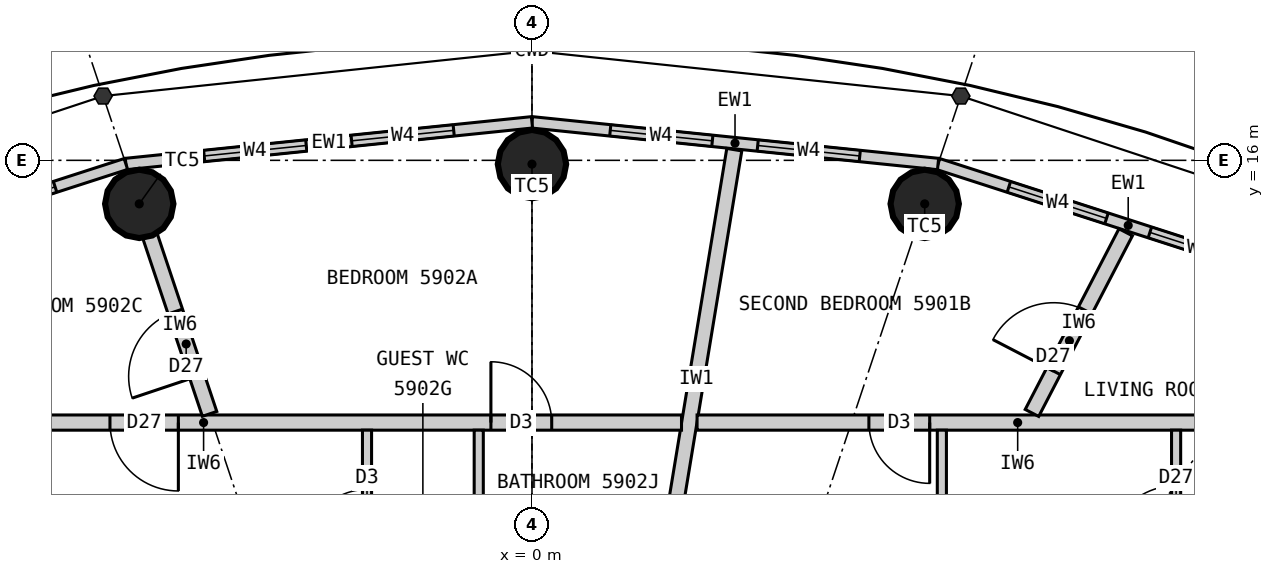
"""IFC4 building model, lengths in metres.
Left out: names, types, materials, properties, quantities, classifications, styles, units other than length and angle.
Written with IfcOpenShell. Run it as: python <this file> out.ifc"""

import sys

from ifc_helpers import new_model, si_unit, direction, frame, frame_2d, origin, origin_2d, place, context, subcontext, project, spatial, rectangle, circle, extrude, element, fill, save


model = new_model("IFC4")
c1 = context("Model", 3, precision=1e-05, world=origin(), true_north=direction((0.0, 1.0)))
c2 = subcontext(c1, "Body", "Model", "MODEL_VIEW")
j1 = project(units=[si_unit("LENGTHUNIT", "METRE"), si_unit("PLANEANGLEUNIT", "RADIAN")], contexts=[c1])
p1 = place(None, origin())
s1 = spatial("IfcSite", under=j1, at=p1, CompositionType="ELEMENT")
p2 = place(p1, origin())
s2 = spatial("IfcBuilding", under=s1, at=p2, CompositionType="ELEMENT")
p3 = place(p2, frame((0.0, 0.0, 219.3)))
s3 = spatial("IfcBuildingStorey", under=s2, at=p3, CompositionType="ELEMENT", Elevation=219.3)
for number, where, z_axis, x_axis in (
    (1, (5.167, 15.427, 0.0), (0.0, 0.0, 1.0), (1.0, 0.0, 0.0)),
    (2, (0.0, 15.95, 0.0), (0.0, 0.0, 1.0), (1.0, 0.0, 0.0)),
    (3, (-5.167, 15.427, 0.0), (0.0, 0.0, 1.0), (1.0, 0.0, 0.0)),
):
    element("IfcColumn", number, at=place(p3, frame(where, z_axis=z_axis, x_axis=x_axis)), inside=s3, PredefinedType="COLUMN", context=c2, shape_type="SweptSolid", body=[
        extrude(circle(Radius=0.45, at=origin_2d()), origin(), (0.0, 0.0, 1.0), 3.3),
    ])
p4 = place(p3, frame((10.346, 14.336, 0.0), z_axis=(0.0, 0.0, 1.0), x_axis=(-0.951644702515, 0.307200846638, 0.0)))
e4 = element("IfcWall", 4, at=p4, inside=s3, PredefinedType="ELEMENTEDWALL", context=c2, shape_type="SweptSolid", body=[
    extrude(rectangle(XDim=5.258, YDim=0.15, at=frame_2d((2.629, 0.0))), origin(), (0.0, 0.0, 1.0), 3.12),
])
p5 = place(p4, frame((0.979, 0.0, 0.9)))
e5 = element("IfcOpeningElement", 5, at=p5, cuts=e4, PredefinedType="OPENING", context=c2, shape_type="SweptSolid", body=[
    extrude(rectangle(XDim=1.35, YDim=1.9, at=frame_2d((0.675, 0.95))), frame((0.0, 0.085, 0.0), z_axis=(0.0, -1.0, 0.0), x_axis=(1.0, 0.0, 0.0)), (0.0, 0.0, 1.0), 0.17),
])
p6 = place(p4, frame((2.929, 0.0, 0.9)))
e6 = element("IfcOpeningElement", 6, at=p6, cuts=e4, PredefinedType="OPENING", context=c2, shape_type="SweptSolid", body=[
    extrude(rectangle(XDim=1.35, YDim=1.9, at=frame_2d((0.675, 0.95))), frame((0.0, 0.085, 0.0), z_axis=(0.0, -1.0, 0.0), x_axis=(1.0, 0.0, 0.0)), (0.0, 0.0, 1.0), 0.17),
])
p7 = place(p3, frame((5.343, 15.952, 0.0), z_axis=(0.0, 0.0, 1.0), x_axis=(-0.994774574972, 0.102095763818, 0.0)))
e7 = element("IfcWall", 7, at=p7, inside=s3, PredefinedType="ELEMENTEDWALL", context=c2, shape_type="SweptSolid", body=[
    extrude(rectangle(XDim=5.371, YDim=0.15, at=frame_2d((2.686, 0.0))), origin(), (0.0, 0.0, 1.0), 3.12),
])
p8 = place(p7, frame((1.035, 0.0, 0.9)))
e8 = element("IfcOpeningElement", 8, at=p8, cuts=e7, PredefinedType="OPENING", context=c2, shape_type="SweptSolid", body=[
    extrude(rectangle(XDim=1.35, YDim=1.9, at=frame_2d((0.675, 0.95))), frame((0.0, 0.085, 0.0), z_axis=(0.0, -1.0, 0.0), x_axis=(1.0, 0.0, 0.0)), (0.0, 0.0, 1.0), 0.17),
])
p9 = place(p7, frame((2.985, 0.0, 0.9)))
e9 = element("IfcOpeningElement", 9, at=p9, cuts=e7, PredefinedType="OPENING", context=c2, shape_type="SweptSolid", body=[
    extrude(rectangle(XDim=1.35, YDim=1.9, at=frame_2d((0.675, 0.95))), frame((0.0, 0.085, 0.0), z_axis=(0.0, -1.0, 0.0), x_axis=(1.0, 0.0, 0.0)), (0.0, 0.0, 1.0), 0.17),
])
p10 = place(p3, frame((0.0, 16.5, 0.0), z_axis=(0.0, 0.0, 1.0), x_axis=(-0.994774574972, -0.102095763818, 0.0)))
e10 = element("IfcWall", 10, at=p10, inside=s3, PredefinedType="ELEMENTEDWALL", context=c2, shape_type="SweptSolid", body=[
    extrude(rectangle(XDim=5.371, YDim=0.15, at=frame_2d((2.686, 0.0))), origin(), (0.0, 0.0, 1.0), 3.12),
])
p11 = place(p10, frame((1.035, 0.0, 0.9)))
e11 = element("IfcOpeningElement", 11, at=p11, cuts=e10, PredefinedType="OPENING", context=c2, shape_type="SweptSolid", body=[
    extrude(rectangle(XDim=1.35, YDim=1.9, at=frame_2d((0.675, 0.95))), frame((0.0, 0.085, 0.0), z_axis=(0.0, -1.0, 0.0), x_axis=(1.0, 0.0, 0.0)), (0.0, 0.0, 1.0), 0.17),
])
p12 = place(p10, frame((2.985, 0.0, 0.9)))
e12 = element("IfcOpeningElement", 12, at=p12, cuts=e10, PredefinedType="OPENING", context=c2, shape_type="SweptSolid", body=[
    extrude(rectangle(XDim=1.35, YDim=1.9, at=frame_2d((0.675, 0.95))), frame((0.0, 0.085, 0.0), z_axis=(0.0, -1.0, 0.0), x_axis=(1.0, 0.0, 0.0)), (0.0, 0.0, 1.0), 0.17),
])
p13 = place(p3, frame((-5.343, 15.952, 0.0), z_axis=(0.0, 0.0, 1.0), x_axis=(-0.951644702515, -0.307200846638, 0.0)))
e13 = element("IfcWall", 13, at=p13, inside=s3, PredefinedType="ELEMENTEDWALL", context=c2, shape_type="SweptSolid", body=[
    extrude(rectangle(XDim=5.258, YDim=0.15, at=frame_2d((2.629, 0.0))), origin(), (0.0, 0.0, 1.0), 3.12),
])
p14 = place(p13, frame((0.979, 0.0, 0.9)))
e14 = element("IfcOpeningElement", 14, at=p14, cuts=e13, PredefinedType="OPENING", context=c2, shape_type="SweptSolid", body=[
    extrude(rectangle(XDim=1.35, YDim=1.9, at=frame_2d((0.675, 0.95))), frame((0.0, 0.085, 0.0), z_axis=(0.0, -1.0, 0.0), x_axis=(1.0, 0.0, 0.0)), (0.0, 0.0, 1.0), 0.17),
])
p15 = place(p13, frame((2.929, 0.0, 0.9)))
e15 = element("IfcOpeningElement", 15, at=p15, cuts=e13, PredefinedType="OPENING", context=c2, shape_type="SweptSolid", body=[
    extrude(rectangle(XDim=1.35, YDim=1.9, at=frame_2d((0.675, 0.95))), frame((0.0, 0.085, 0.0), z_axis=(0.0, -1.0, 0.0), x_axis=(1.0, 0.0, 0.0)), (0.0, 0.0, 1.0), 0.17),
])
p16 = place(p3, frame((1.666, 10.1, 0.0), z_axis=(0.0, 0.0, 1.0), x_axis=(0.162710847913, 0.986673796131, 0.0)))
e16 = element("IfcWall", 16, at=p16, inside=s3, PredefinedType="PARTITIONING", context=c2, shape_type="SweptSolid", body=[
    extrude(rectangle(XDim=6.122, YDim=0.2, at=frame_2d((3.061, 0.0))), origin(), (0.0, 0.0, 1.0), 3.12),
])
p17 = place(p3, frame((10.609, 12.55, 0.0), z_axis=(0.0, 0.0, 1.0), x_axis=(-1.0, 0.0, 0.0)))
e17 = element("IfcWall", 17, at=p17, inside=s3, PredefinedType="PARTITIONING", context=c2, shape_type="SweptSolid", body=[
    extrude(rectangle(XDim=8.437, YDim=0.2, at=frame_2d((4.218, 0.0))), origin(), (0.0, 0.0, 1.0), 3.12),
])
p18 = place(p17, frame((5.376, 0.0, 0.0)))
e18 = element("IfcOpeningElement", 18, at=p18, cuts=e17, PredefinedType="OPENING", context=c2, shape_type="SweptSolid", body=[
    extrude(rectangle(XDim=0.8, YDim=2.1, at=frame_2d((0.4, 1.05))), frame((0.0, 0.11, 0.0), z_axis=(0.0, -1.0, 0.0), x_axis=(1.0, 0.0, 0.0)), (0.0, 0.0, 1.0), 0.22),
])
p19 = place(p3, frame((6.578, 12.677, 0.0), z_axis=(0.0, 0.0, 1.0), x_axis=(0.460620531465, 0.887597164255, 0.0)))
e19 = element("IfcWall", 19, at=p19, inside=s3, PredefinedType="PARTITIONING", context=c2, shape_type="SweptSolid", body=[
    extrude(rectangle(XDim=2.678, YDim=0.2, at=frame_2d((1.339, 0.0))), origin(), (0.0, 0.0, 1.0), 3.12),
])
p20 = place(p19, frame((0.62, 0.0, 0.0)))
e20 = element("IfcOpeningElement", 20, at=p20, cuts=e19, PredefinedType="OPENING", context=c2, shape_type="SweptSolid", body=[
    extrude(rectangle(XDim=0.9, YDim=2.1, at=frame_2d((0.45, 1.05))), frame((0.0, 0.11, 0.0), z_axis=(0.0, -1.0, 0.0), x_axis=(1.0, 0.0, 0.0)), (0.0, 0.0, 1.0), 0.22),
])
p21 = place(p3, frame((8.475, 10.1, 0.0), z_axis=(0.0, 0.0, 1.0), x_axis=(0.0, 1.0, 0.0)))
e21 = element("IfcWall", 21, at=p21, inside=s3, PredefinedType="PARTITIONING", context=c2, shape_type="SweptSolid", body=[
    extrude(rectangle(XDim=2.35, YDim=0.12, at=frame_2d((1.175, 0.0))), origin(), (0.0, 0.0, 1.0), 3.12),
])
p22 = place(p21, frame((0.72, 0.0, 0.0)))
e22 = element("IfcOpeningElement", 22, at=p22, cuts=e21, PredefinedType="OPENING", context=c2, shape_type="SweptSolid", body=[
    extrude(rectangle(XDim=0.9, YDim=2.1, at=frame_2d((0.45, 1.05))), frame((0.0, 0.07, 0.0), z_axis=(0.0, -1.0, 0.0), x_axis=(1.0, 0.0, 0.0)), (0.0, 0.0, 1.0), 0.14),
])
p23 = place(p3, frame((5.393, 10.1, 0.0), z_axis=(0.0, 0.0, 1.0), x_axis=(0.0, 1.0, 0.0)))
e23 = element("IfcWall", 23, at=p23, inside=s3, PredefinedType="PARTITIONING", context=c2, shape_type="SweptSolid", body=[
    extrude(rectangle(XDim=2.35, YDim=0.12, at=frame_2d((1.175, 0.0))), origin(), (0.0, 0.0, 1.0), 3.12),
])
p24 = place(p3, frame((1.968, 12.55, 0.0), z_axis=(0.0, 0.0, 1.0), x_axis=(-1.0, 0.0, 0.0)))
e24 = element("IfcWall", 24, at=p24, inside=s3, PredefinedType="PARTITIONING", context=c2, shape_type="SweptSolid", body=[
    extrude(rectangle(XDim=12.576, YDim=0.2, at=frame_2d((6.288, 0.0))), origin(), (0.0, 0.0, 1.0), 3.12),
])
p25 = place(p24, frame((1.708, 0.0, 0.0)))
e25 = element("IfcOpeningElement", 25, at=p25, cuts=e24, PredefinedType="OPENING", context=c2, shape_type="SweptSolid", body=[
    extrude(rectangle(XDim=0.8, YDim=2.1, at=frame_2d((0.4, 1.05))), frame((0.0, 0.11, 0.0), z_axis=(0.0, -1.0, 0.0), x_axis=(1.0, 0.0, 0.0)), (0.0, 0.0, 1.0), 0.22),
])
p26 = place(p24, frame((6.62, 0.0, 0.0)))
e26 = element("IfcOpeningElement", 26, at=p26, cuts=e24, PredefinedType="OPENING", context=c2, shape_type="SweptSolid", body=[
    extrude(rectangle(XDim=0.9, YDim=2.1, at=frame_2d((0.45, 1.05))), frame((0.0, 0.11, 0.0), z_axis=(0.0, -1.0, 0.0), x_axis=(1.0, 0.0, 0.0)), (0.0, 0.0, 1.0), 0.22),
])
p27 = place(p3, frame((-4.242, 12.664, 0.0), z_axis=(0.0, 0.0, 1.0), x_axis=(-0.317594928911, 0.948226481981, 0.0)))
e27 = element("IfcWall", 27, at=p27, inside=s3, PredefinedType="PARTITIONING", context=c2, shape_type="SweptSolid", body=[
    extrude(rectangle(XDim=2.464, YDim=0.2, at=frame_2d((1.232, 0.0))), origin(), (0.0, 0.0, 1.0), 2.42),
])
p28 = place(p27, frame((0.52, 0.0, 0.0)))
e28 = element("IfcOpeningElement", 28, at=p28, cuts=e27, PredefinedType="OPENING", context=c2, shape_type="SweptSolid", body=[
    extrude(rectangle(XDim=0.9, YDim=2.1, at=frame_2d((0.45, 1.05))), frame((0.0, 0.11, 0.0), z_axis=(0.0, -1.0, 0.0), x_axis=(1.0, 0.0, 0.0)), (0.0, 0.0, 1.0), 0.22),
])
p29 = place(p3, frame((-0.7, 10.1, 0.0), z_axis=(0.0, 0.0, 1.0), x_axis=(0.0, 1.0, 0.0)))
e29 = element("IfcWall", 29, at=p29, inside=s3, PredefinedType="PARTITIONING", context=c2, shape_type="SweptSolid", body=[
    extrude(rectangle(XDim=2.35, YDim=0.12, at=frame_2d((1.175, 0.0))), origin(), (0.0, 0.0, 1.0), 3.12),
])
p30 = place(p3, frame((-2.17, 10.1, 0.0), z_axis=(0.0, 0.0, 1.0), x_axis=(0.0, 1.0, 0.0)))
e30 = element("IfcWall", 30, at=p30, inside=s3, PredefinedType="PARTITIONING", context=c2, shape_type="SweptSolid", body=[
    extrude(rectangle(XDim=2.35, YDim=0.12, at=frame_2d((1.175, 0.0))), origin(), (0.0, 0.0, 1.0), 3.12),
])
p31 = place(p30, frame((0.77, 0.0, 0.0)))
e31 = element("IfcOpeningElement", 31, at=p31, cuts=e30, PredefinedType="OPENING", context=c2, shape_type="SweptSolid", body=[
    extrude(rectangle(XDim=0.8, YDim=2.1, at=frame_2d((0.4, 1.05))), frame((0.0, 0.07, 0.0), z_axis=(0.0, -1.0, 0.0), x_axis=(1.0, 0.0, 0.0)), (0.0, 0.0, 1.0), 0.14),
])
p32 = place(p5, origin())
e32 = element("IfcWindow", 32, at=p32, inside=s3, PartitioningType="SINGLE_PANEL", PredefinedType="WINDOW", context=c2, shape_type="SweptSolid", body=[
    extrude(rectangle(XDim=1.35, YDim=1.9, at=frame_2d((0.675, 0.95))), frame((0.0, 0.03, 0.0), z_axis=(0.0, -1.0, 0.0), x_axis=(1.0, 0.0, 0.0)), (0.0, 0.0, 1.0), 0.06),
])
fill(e5, e32)
p33 = place(p6, origin())
e33 = element("IfcWindow", 33, at=p33, inside=s3, PartitioningType="SINGLE_PANEL", PredefinedType="WINDOW", context=c2, shape_type="SweptSolid", body=[
    extrude(rectangle(XDim=1.35, YDim=1.9, at=frame_2d((0.675, 0.95))), frame((0.0, 0.03, 0.0), z_axis=(0.0, -1.0, 0.0), x_axis=(1.0, 0.0, 0.0)), (0.0, 0.0, 1.0), 0.06),
])
fill(e6, e33)
p34 = place(p8, origin())
e34 = element("IfcWindow", 34, at=p34, inside=s3, PartitioningType="SINGLE_PANEL", PredefinedType="WINDOW", context=c2, shape_type="SweptSolid", body=[
    extrude(rectangle(XDim=1.35, YDim=1.9, at=frame_2d((0.675, 0.95))), frame((0.0, 0.03, 0.0), z_axis=(0.0, -1.0, 0.0), x_axis=(1.0, 0.0, 0.0)), (0.0, 0.0, 1.0), 0.06),
])
fill(e8, e34)
p35 = place(p9, origin())
e35 = element("IfcWindow", 35, at=p35, inside=s3, PartitioningType="SINGLE_PANEL", PredefinedType="WINDOW", context=c2, shape_type="SweptSolid", body=[
    extrude(rectangle(XDim=1.35, YDim=1.9, at=frame_2d((0.675, 0.95))), frame((0.0, 0.03, 0.0), z_axis=(0.0, -1.0, 0.0), x_axis=(1.0, 0.0, 0.0)), (0.0, 0.0, 1.0), 0.06),
])
fill(e9, e35)
p36 = place(p11, origin())
e36 = element("IfcWindow", 36, at=p36, inside=s3, PartitioningType="SINGLE_PANEL", PredefinedType="WINDOW", context=c2, shape_type="SweptSolid", body=[
    extrude(rectangle(XDim=1.35, YDim=1.9, at=frame_2d((0.675, 0.95))), frame((0.0, 0.03, 0.0), z_axis=(0.0, -1.0, 0.0), x_axis=(1.0, 0.0, 0.0)), (0.0, 0.0, 1.0), 0.06),
])
fill(e11, e36)
p37 = place(p12, origin())
e37 = element("IfcWindow", 37, at=p37, inside=s3, PartitioningType="SINGLE_PANEL", PredefinedType="WINDOW", context=c2, shape_type="SweptSolid", body=[
    extrude(rectangle(XDim=1.35, YDim=1.9, at=frame_2d((0.675, 0.95))), frame((0.0, 0.03, 0.0), z_axis=(0.0, -1.0, 0.0), x_axis=(1.0, 0.0, 0.0)), (0.0, 0.0, 1.0), 0.06),
])
fill(e12, e37)
p38 = place(p14, origin())
e38 = element("IfcWindow", 38, at=p38, inside=s3, PartitioningType="SINGLE_PANEL", PredefinedType="WINDOW", context=c2, shape_type="SweptSolid", body=[
    extrude(rectangle(XDim=1.35, YDim=1.9, at=frame_2d((0.675, 0.95))), frame((0.0, 0.03, 0.0), z_axis=(0.0, -1.0, 0.0), x_axis=(1.0, 0.0, 0.0)), (0.0, 0.0, 1.0), 0.06),
])
fill(e14, e38)
p39 = place(p22, origin())
e39 = element("IfcDoor", 39, at=p39, inside=s3, OperationType="SINGLE_SWING_LEFT", PredefinedType="DOOR", context=c2, shape_type="SweptSolid", body=[
    extrude(rectangle(XDim=0.9, YDim=2.1, at=frame_2d((0.45, 1.05))), frame((0.0, 0.025, 0.0), z_axis=(0.0, -1.0, 0.0), x_axis=(1.0, 0.0, 0.0)), (0.0, 0.0, 1.0), 0.05),
])
fill(e22, e39)
p40 = place(p18, origin())
e40 = element("IfcDoor", 40, at=p40, inside=s3, OperationType="SINGLE_SWING_LEFT", PredefinedType="DOOR", context=c2, shape_type="SweptSolid", body=[
    extrude(rectangle(XDim=0.8, YDim=2.1, at=frame_2d((0.4, 1.05))), frame((0.0, 0.025, 0.0), z_axis=(0.0, -1.0, 0.0), x_axis=(1.0, 0.0, 0.0)), (0.0, 0.0, 1.0), 0.05),
])
fill(e18, e40)
p41 = place(p20, origin())
e41 = element("IfcDoor", 41, at=p41, inside=s3, OperationType="SINGLE_SWING_LEFT", PredefinedType="DOOR", context=c2, shape_type="SweptSolid", body=[
    extrude(rectangle(XDim=0.9, YDim=2.1, at=frame_2d((0.45, 1.05))), frame((0.0, 0.025, 0.0), z_axis=(0.0, -1.0, 0.0), x_axis=(1.0, 0.0, 0.0)), (0.0, 0.0, 1.0), 0.05),
])
fill(e20, e41)
p42 = place(p25, origin())
e42 = element("IfcDoor", 42, at=p42, inside=s3, OperationType="SINGLE_SWING_RIGHT", PredefinedType="DOOR", context=c2, shape_type="SweptSolid", body=[
    extrude(rectangle(XDim=0.8, YDim=2.1, at=frame_2d((0.4, 1.05))), frame((0.0, 0.025, 0.0), z_axis=(0.0, -1.0, 0.0), x_axis=(1.0, 0.0, 0.0)), (0.0, 0.0, 1.0), 0.05),
])
fill(e25, e42)
p43 = place(p31, origin())
e43 = element("IfcDoor", 43, at=p43, inside=s3, OperationType="SINGLE_SWING_LEFT", PredefinedType="DOOR", context=c2, shape_type="SweptSolid", body=[
    extrude(rectangle(XDim=0.8, YDim=2.1, at=frame_2d((0.4, 1.05))), frame((0.0, 0.025, 0.0), z_axis=(0.0, -1.0, 0.0), x_axis=(1.0, 0.0, 0.0)), (0.0, 0.0, 1.0), 0.05),
])
fill(e31, e43)
p44 = place(p26, origin())
e44 = element("IfcDoor", 44, at=p44, inside=s3, OperationType="SINGLE_SWING_LEFT", PredefinedType="DOOR", context=c2, shape_type="SweptSolid", body=[
    extrude(rectangle(XDim=0.9, YDim=2.1, at=frame_2d((0.45, 1.05))), frame((0.0, 0.025, 0.0), z_axis=(0.0, -1.0, 0.0), x_axis=(1.0, 0.0, 0.0)), (0.0, 0.0, 1.0), 0.05),
])
fill(e26, e44)
p45 = place(p28, origin())
e45 = element("IfcDoor", 45, at=p45, inside=s3, OperationType="SINGLE_SWING_LEFT", PredefinedType="DOOR", context=c2, shape_type="SweptSolid", body=[
    extrude(rectangle(XDim=0.9, YDim=2.1, at=frame_2d((0.45, 1.05))), frame((0.0, 0.025, 0.0), z_axis=(0.0, -1.0, 0.0), x_axis=(1.0, 0.0, 0.0)), (0.0, 0.0, 1.0), 0.05),
])
fill(e28, e45)
save(model, sys.argv[1])
